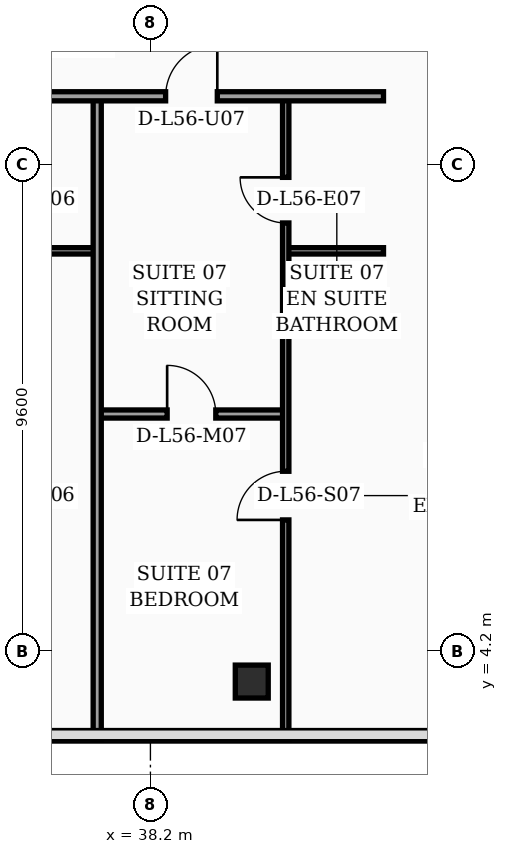
"""IFC4 building model, lengths in metres.
Left out: names, types, materials, properties, quantities, classifications, styles, units other than length and angle.
Written with IfcOpenShell. Run it as: python <this file> out.ifc"""

import sys

from ifc_helpers import new_model, si_unit, direction, frame, frame_2d, origin, origin_2d, place, context, subcontext, project, spatial, rectangle, hollow_rectangle, extrude, element, fill, save


model = new_model("IFC4")
c1 = context("Model", 3, precision=1e-05, world=origin(), true_north=direction((0.0, 1.0)))
c2 = subcontext(c1, "Body", "Model", "MODEL_VIEW")
j1 = project(units=[si_unit("LENGTHUNIT", "METRE"), si_unit("PLANEANGLEUNIT", "RADIAN")], contexts=[c1])
p1 = place(None, origin())
s1 = spatial("IfcSite", under=j1, at=p1, CompositionType="ELEMENT")
p2 = place(p1, origin())
s2 = spatial("IfcBuilding", under=s1, at=p2, CompositionType="ELEMENT")
p3 = place(p2, frame((0.0, 0.0, 226.9)))
s3 = spatial("IfcBuildingStorey", under=s2, at=p3, CompositionType="ELEMENT", Elevation=226.9)
p4 = place(p3, frame((40.2, 3.6, 0.0), z_axis=(0.0, 0.0, 1.0), x_axis=(1.0, 0.0, 0.0)))
e1 = element("IfcColumn", 1, at=p4, inside=s3, PredefinedType="COLUMN", context=c2, shape_type="SweptSolid", body=[
    extrude(hollow_rectangle(XDim=0.65, YDim=0.65, WallThickness=0.028, at=origin_2d()), origin(), (0.0, 0.0, 1.0), 3.56),
])
p5 = place(p3, frame((49.43, 5.505, 0.0), z_axis=(0.0, 0.0, 1.0), x_axis=(-0.300509063924, 0.953778958931, 0.0)))
e2 = element("IfcWall", 2, at=p5, inside=s3, PredefinedType="SOLIDWALL", context=c2, shape_type="SweptSolid", body=[
    extrude(rectangle(XDim=30.814, YDim=0.32, at=frame_2d((15.407, 0.0))), origin(), (0.0, 0.0, 1.0), 3.56),
])
p6 = place(p5, frame((10.199, 0.0, 0.0)))
e3 = element("IfcOpeningElement", 3, at=p6, cuts=e2, PredefinedType="OPENING", context=c2, shape_type="SweptSolid", body=[
    extrude(rectangle(XDim=1.4, YDim=2.25, at=frame_2d((0.7, 1.125))), frame((0.0, 0.17, 0.0), z_axis=(0.0, -1.0, 0.0), x_axis=(1.0, 0.0, 0.0)), (0.0, 0.0, 1.0), 0.34),
])
p7 = place(p5, frame((4.437, 0.0, 0.7)))
e4 = element("IfcOpeningElement", 4, at=p7, cuts=e2, PredefinedType="OPENING", context=c2, shape_type="SweptSolid", body=[
    extrude(rectangle(XDim=1.6, YDim=1.65, at=frame_2d((0.8, 0.825))), frame((0.0, 0.17, 0.0), z_axis=(0.0, -1.0, 0.0), x_axis=(1.0, 0.0, 0.0)), (0.0, 0.0, 1.0), 0.34),
])
p8 = place(p5, frame((18.696, 0.0, 0.7)))
e5 = element("IfcOpeningElement", 5, at=p8, cuts=e2, PredefinedType="OPENING", context=c2, shape_type="SweptSolid", body=[
    extrude(rectangle(XDim=1.6, YDim=1.65, at=frame_2d((0.8, 0.825))), frame((0.0, 0.17, 0.0), z_axis=(0.0, -1.0, 0.0), x_axis=(1.0, 0.0, 0.0)), (0.0, 0.0, 1.0), 0.34),
])
p9 = place(p5, frame((1.6, 0.0, 0.75)))
e6 = element("IfcOpeningElement", 6, at=p9, cuts=e2, PredefinedType="OPENING", context=c2, shape_type="SweptSolid", body=[
    extrude(rectangle(XDim=1.5, YDim=1.6, at=frame_2d((0.75, 0.8))), frame((0.0, 0.17, 0.0), z_axis=(0.0, -1.0, 0.0), x_axis=(1.0, 0.0, 0.0)), (0.0, 0.0, 1.0), 0.34),
])
p10 = place(p5, frame((7.8, 0.0, 0.75)))
e7 = element("IfcOpeningElement", 7, at=p10, cuts=e2, PredefinedType="OPENING", context=c2, shape_type="SweptSolid", body=[
    extrude(rectangle(XDim=1.5, YDim=1.6, at=frame_2d((0.75, 0.8))), frame((0.0, 0.17, 0.0), z_axis=(0.0, -1.0, 0.0), x_axis=(1.0, 0.0, 0.0)), (0.0, 0.0, 1.0), 0.34),
])
p11 = place(p5, frame((14.0, 0.0, 0.75)))
e8 = element("IfcOpeningElement", 8, at=p11, cuts=e2, PredefinedType="OPENING", context=c2, shape_type="SweptSolid", body=[
    extrude(rectangle(XDim=1.5, YDim=1.6, at=frame_2d((0.75, 0.8))), frame((0.0, 0.17, 0.0), z_axis=(0.0, -1.0, 0.0), x_axis=(1.0, 0.0, 0.0)), (0.0, 0.0, 1.0), 0.34),
])
p12 = place(p5, frame((16.55, 0.0, 0.75)))
e9 = element("IfcOpeningElement", 9, at=p12, cuts=e2, PredefinedType="OPENING", context=c2, shape_type="SweptSolid", body=[
    extrude(rectangle(XDim=1.5, YDim=1.6, at=frame_2d((0.75, 0.8))), frame((0.0, 0.17, 0.0), z_axis=(0.0, -1.0, 0.0), x_axis=(1.0, 0.0, 0.0)), (0.0, 0.0, 1.0), 0.34),
])
p13 = place(p5, frame((20.75, 0.0, 0.75)))
e10 = element("IfcOpeningElement", 10, at=p13, cuts=e2, PredefinedType="OPENING", context=c2, shape_type="SweptSolid", body=[
    extrude(rectangle(XDim=1.5, YDim=1.6, at=frame_2d((0.75, 0.8))), frame((0.0, 0.17, 0.0), z_axis=(0.0, -1.0, 0.0), x_axis=(1.0, 0.0, 0.0)), (0.0, 0.0, 1.0), 0.34),
])
p14 = place(p5, frame((23.3, 0.0, 0.75)))
e11 = element("IfcOpeningElement", 11, at=p14, cuts=e2, PredefinedType="OPENING", context=c2, shape_type="SweptSolid", body=[
    extrude(rectangle(XDim=1.5, YDim=1.6, at=frame_2d((0.75, 0.8))), frame((0.0, 0.17, 0.0), z_axis=(0.0, -1.0, 0.0), x_axis=(1.0, 0.0, 0.0)), (0.0, 0.0, 1.0), 0.34),
])
p15 = place(p5, frame((26.4, 0.0, 0.75)))
e12 = element("IfcOpeningElement", 12, at=p15, cuts=e2, PredefinedType="OPENING", context=c2, shape_type="SweptSolid", body=[
    extrude(rectangle(XDim=1.5, YDim=1.6, at=frame_2d((0.75, 0.8))), frame((0.0, 0.17, 0.0), z_axis=(0.0, -1.0, 0.0), x_axis=(1.0, 0.0, 0.0)), (0.0, 0.0, 1.0), 0.34),
])
for number, where, z_axis, x_axis in (
    (13, (35.22, 12.1, 0.0), (0.0, 0.0, 1.0), (1.0, 0.0, 0.0)),
    (14, (40.87, 12.1, 0.0), (0.0, 0.0, 1.0), (1.0, 0.0, 0.0)),
):
    element("IfcWall", number, at=place(p3, frame(where, z_axis=z_axis, x_axis=x_axis)), inside=s3, PredefinedType="PARTITIONING", context=c2, shape_type="SweptSolid", body=[
        extrude(rectangle(XDim=1.93, YDim=0.125, at=frame_2d((0.965, 0.0))), origin(), (0.0, 0.0, 1.0), 3.56),
    ])
p16 = place(p3, frame((37.15, 8.88, 0.0), z_axis=(0.0, 0.0, 1.0), x_axis=(1.0, 0.0, 0.0)))
e15 = element("IfcWall", 15, at=p16, inside=s3, PredefinedType="PARTITIONING", context=c2, shape_type="SweptSolid", body=[
    extrude(rectangle(XDim=3.72, YDim=0.16, at=frame_2d((1.86, 0.0))), origin(), (0.0, 0.0, 1.0), 2.94),
])
p17 = place(p16, frame((1.38, 0.0, 0.0)))
e16 = element("IfcOpeningElement", 16, at=p17, cuts=e15, PredefinedType="OPENING", context=c2, shape_type="SweptSolid", body=[
    extrude(rectangle(XDim=0.96, YDim=2.2, at=frame_2d((0.48, 1.1))), frame((0.0, 0.09, 0.0), z_axis=(0.0, -1.0, 0.0), x_axis=(1.0, 0.0, 0.0)), (0.0, 0.0, 1.0), 0.18),
])
p18 = place(p3, frame((40.87, 2.44, 0.0), z_axis=(0.0, 0.0, 1.0), x_axis=(0.0, 1.0, 0.0)))
e17 = element("IfcWall", 17, at=p18, inside=s3, PredefinedType="PARTITIONING", context=c2, shape_type="SweptSolid", body=[
    extrude(rectangle(XDim=12.71, YDim=0.125, at=frame_2d((6.355, 0.0))), origin(), (0.0, 0.0, 1.0), 2.94),
])
p19 = place(p18, frame((4.35, 0.0, 0.0)))
e18 = element("IfcOpeningElement", 18, at=p19, cuts=e17, PredefinedType="OPENING", context=c2, shape_type="SweptSolid", body=[
    extrude(rectangle(XDim=0.96, YDim=2.2, at=frame_2d((0.48, 1.1))), frame((0.0, 0.073, 0.0), z_axis=(0.0, -1.0, 0.0), x_axis=(1.0, 0.0, 0.0)), (0.0, 0.0, 1.0), 0.145),
])
p20 = place(p18, frame((10.21, 0.0, 0.0)))
e19 = element("IfcOpeningElement", 19, at=p20, cuts=e17, PredefinedType="OPENING", context=c2, shape_type="SweptSolid", body=[
    extrude(rectangle(XDim=0.9, YDim=2.15, at=frame_2d((0.45, 1.075))), frame((0.0, 0.073, 0.0), z_axis=(0.0, -1.0, 0.0), x_axis=(1.0, 0.0, 0.0)), (0.0, 0.0, 1.0), 0.145),
])
p21 = place(p3, frame((37.15, 2.44, 0.0), z_axis=(0.0, 0.0, 1.0), x_axis=(0.0, 1.0, 0.0)))
e20 = element("IfcWall", 20, at=p21, inside=s3, PredefinedType="PARTITIONING", context=c2, shape_type="SweptSolid", body=[
    extrude(rectangle(XDim=12.71, YDim=0.16, at=frame_2d((6.355, 0.0))), origin(), (0.0, 0.0, 1.0), 2.94),
])
p22 = place(p3, frame((32.4, 15.15, 0.0), z_axis=(0.0, 0.0, 1.0), x_axis=(1.0, 0.0, 0.0)))
e21 = element("IfcWall", 21, at=p22, inside=s3, PredefinedType="PARTITIONING", context=c2, shape_type="SweptSolid", body=[
    extrude(rectangle(XDim=10.4, YDim=0.18, at=frame_2d((5.2, 0.0))), origin(), (0.0, 0.0, 1.0), 2.94),
])
p23 = place(p22, frame((1.0, 0.0, 0.0)))
e22 = element("IfcOpeningElement", 22, at=p23, cuts=e21, PredefinedType="OPENING", context=c2, shape_type="SweptSolid", body=[
    extrude(rectangle(XDim=1.02, YDim=2.2, at=frame_2d((0.51, 1.1))), frame((0.0, 0.1, 0.0), z_axis=(0.0, -1.0, 0.0), x_axis=(1.0, 0.0, 0.0)), (0.0, 0.0, 1.0), 0.2),
])
p24 = place(p22, frame((6.1, 0.0, 0.0)))
e23 = element("IfcOpeningElement", 23, at=p24, cuts=e21, PredefinedType="OPENING", context=c2, shape_type="SweptSolid", body=[
    extrude(rectangle(XDim=1.02, YDim=2.2, at=frame_2d((0.51, 1.1))), frame((0.0, 0.1, 0.0), z_axis=(0.0, -1.0, 0.0), x_axis=(1.0, 0.0, 0.0)), (0.0, 0.0, 1.0), 0.2),
])
p25 = place(p17, origin())
e24 = element("IfcDoor", 24, at=p25, inside=s3, OperationType="SINGLE_SWING_LEFT", PredefinedType="DOOR", context=c2, shape_type="SweptSolid", body=[
    extrude(rectangle(XDim=0.96, YDim=2.2, at=frame_2d((0.48, 1.1))), frame((0.0, 0.025, 0.0), z_axis=(0.0, -1.0, 0.0), x_axis=(1.0, 0.0, 0.0)), (0.0, 0.0, 1.0), 0.05),
])
fill(e16, e24)
p26 = place(p19, origin())
e25 = element("IfcDoor", 25, at=p26, inside=s3, OperationType="SINGLE_SWING_LEFT", PredefinedType="DOOR", context=c2, shape_type="SweptSolid", body=[
    extrude(rectangle(XDim=0.96, YDim=2.2, at=frame_2d((0.48, 1.1))), frame((0.0, 0.025, 0.0), z_axis=(0.0, -1.0, 0.0), x_axis=(1.0, 0.0, 0.0)), (0.0, 0.0, 1.0), 0.05),
])
fill(e18, e25)
p27 = place(p20, origin())
e26 = element("IfcDoor", 26, at=p27, inside=s3, OperationType="SINGLE_SWING_RIGHT", PredefinedType="DOOR", context=c2, shape_type="SweptSolid", body=[
    extrude(rectangle(XDim=0.9, YDim=2.15, at=frame_2d((0.45, 1.075))), frame((0.0, 0.025, 0.0), z_axis=(0.0, -1.0, 0.0), x_axis=(1.0, 0.0, 0.0)), (0.0, 0.0, 1.0), 0.05),
])
fill(e19, e26)
p28 = place(p24, origin())
e27 = element("IfcDoor", 27, at=p28, inside=s3, OperationType="SINGLE_SWING_RIGHT", PredefinedType="DOOR", context=c2, shape_type="SweptSolid", body=[
    extrude(rectangle(XDim=1.02, YDim=2.2, at=frame_2d((0.51, 1.1))), frame((0.0, 0.025, 0.0), z_axis=(0.0, -1.0, 0.0), x_axis=(1.0, 0.0, 0.0)), (0.0, 0.0, 1.0), 0.05),
])
fill(e23, e27)
save(model, sys.argv[1])
